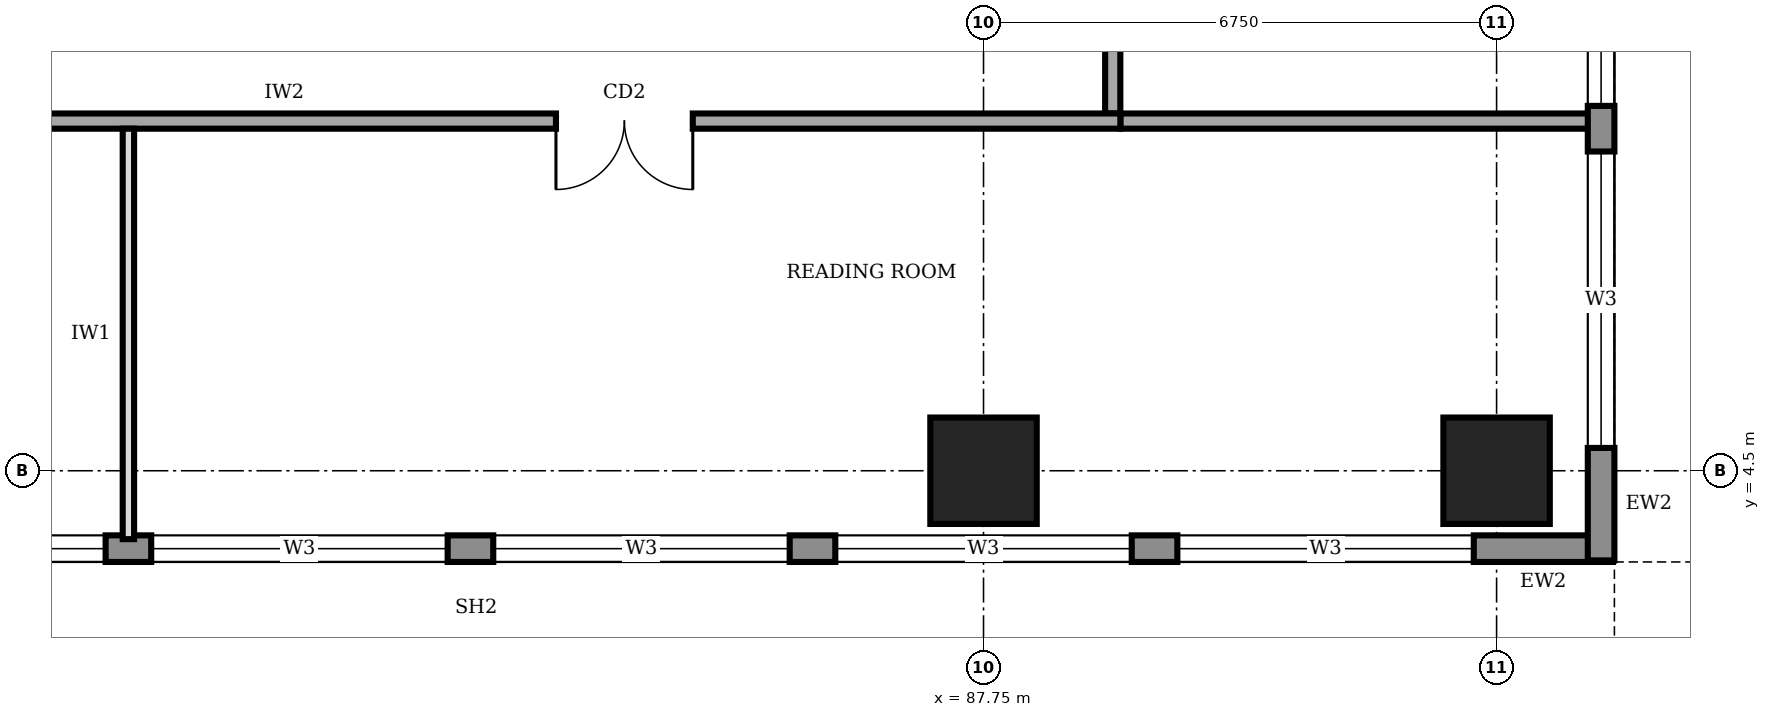
"""IFC4 building model, lengths in metres.
Left out: names, types, materials, properties, quantities, classifications, styles, units other than length and angle.
Written with IfcOpenShell. Run it as: python <this file> out.ifc"""

import sys

from ifc_helpers import new_model, si_unit, direction, frame, frame_2d, origin, origin_2d, place, context, subcontext, project, spatial, rectangle, extrude, element, fill, save


model = new_model("IFC4")
c1 = context("Model", 3, precision=1e-05, world=origin(), true_north=direction((0.0, 1.0)))
c2 = subcontext(c1, "Body", "Model", "MODEL_VIEW")
j1 = project(units=[si_unit("LENGTHUNIT", "METRE"), si_unit("PLANEANGLEUNIT", "RADIAN")], contexts=[c1])
p1 = place(None, origin())
s1 = spatial("IfcSite", under=j1, at=p1, CompositionType="ELEMENT")
p2 = place(p1, origin())
s2 = spatial("IfcBuilding", under=s1, at=p2, CompositionType="ELEMENT")
p3 = place(p2, frame((0.0, 0.0, 177.0)))
s3 = spatial("IfcBuildingStorey", under=s2, at=p3, CompositionType="ELEMENT", Elevation=177.0)
for number, where, z_axis, x_axis in (
    (1, (87.75, 4.5, 0.0), (0.0, 0.0, 1.0), (1.0, 0.0, 0.0)),
    (2, (94.5, 4.5, 0.0), (0.0, 0.0, 1.0), (1.0, 0.0, 0.0)),
):
    element("IfcColumn", number, at=place(p3, frame(where, z_axis=z_axis, x_axis=x_axis)), inside=s3, PredefinedType="COLUMN", context=c2, shape_type="SweptSolid", body=[
        extrude(rectangle(XDim=1.4, YDim=1.4, at=origin_2d()), origin(), (0.0, 0.0, 1.0), 4.0),
    ])
p4 = place(p3, frame((66.12, 3.475, 0.0), z_axis=(0.0, 0.0, 1.0), x_axis=(1.0, 0.0, 0.0)))
e3 = element("IfcWall", 3, at=p4, inside=s3, PredefinedType="STANDARD", context=c2, shape_type="SweptSolid", body=[
    extrude(rectangle(XDim=29.91, YDim=0.35, at=frame_2d((14.955, 0.0))), origin(), (0.0, 0.0, 1.0), 3.75),
])
p5 = place(p4, frame((1.68, 0.0, 0.95)))
e4 = element("IfcOpeningElement", 4, at=p5, cuts=e3, PredefinedType="OPENING", context=c2, shape_type="SweptSolid", body=[
    extrude(rectangle(XDim=3.9, YDim=1.8, at=frame_2d((1.95, 0.9))), frame((0.0, 0.185, 0.0), z_axis=(0.0, -1.0, 0.0), x_axis=(1.0, 0.0, 0.0)), (0.0, 0.0, 1.0), 0.37),
])
p6 = place(p4, frame((6.18, 0.0, 0.95)))
e5 = element("IfcOpeningElement", 5, at=p6, cuts=e3, PredefinedType="OPENING", context=c2, shape_type="SweptSolid", body=[
    extrude(rectangle(XDim=3.9, YDim=1.8, at=frame_2d((1.95, 0.9))), frame((0.0, 0.185, 0.0), z_axis=(0.0, -1.0, 0.0), x_axis=(1.0, 0.0, 0.0)), (0.0, 0.0, 1.0), 0.37),
])
p7 = place(p4, frame((10.68, 0.0, 0.95)))
e6 = element("IfcOpeningElement", 6, at=p7, cuts=e3, PredefinedType="OPENING", context=c2, shape_type="SweptSolid", body=[
    extrude(rectangle(XDim=3.9, YDim=1.8, at=frame_2d((1.95, 0.9))), frame((0.0, 0.185, 0.0), z_axis=(0.0, -1.0, 0.0), x_axis=(1.0, 0.0, 0.0)), (0.0, 0.0, 1.0), 0.37),
])
p8 = place(p4, frame((15.18, 0.0, 0.95)))
e7 = element("IfcOpeningElement", 7, at=p8, cuts=e3, PredefinedType="OPENING", context=c2, shape_type="SweptSolid", body=[
    extrude(rectangle(XDim=3.9, YDim=1.8, at=frame_2d((1.95, 0.9))), frame((0.0, 0.185, 0.0), z_axis=(0.0, -1.0, 0.0), x_axis=(1.0, 0.0, 0.0)), (0.0, 0.0, 1.0), 0.37),
])
p9 = place(p4, frame((19.68, 0.0, 0.95)))
e8 = element("IfcOpeningElement", 8, at=p9, cuts=e3, PredefinedType="OPENING", context=c2, shape_type="SweptSolid", body=[
    extrude(rectangle(XDim=3.9, YDim=1.8, at=frame_2d((1.95, 0.9))), frame((0.0, 0.185, 0.0), z_axis=(0.0, -1.0, 0.0), x_axis=(1.0, 0.0, 0.0)), (0.0, 0.0, 1.0), 0.37),
])
p10 = place(p4, frame((24.18, 0.0, 0.95)))
e9 = element("IfcOpeningElement", 9, at=p10, cuts=e3, PredefinedType="OPENING", context=c2, shape_type="SweptSolid", body=[
    extrude(rectangle(XDim=3.9, YDim=1.8, at=frame_2d((1.95, 0.9))), frame((0.0, 0.185, 0.0), z_axis=(0.0, -1.0, 0.0), x_axis=(1.0, 0.0, 0.0)), (0.0, 0.0, 1.0), 0.37),
])
p11 = place(p3, frame((95.875, 3.32, 0.0), z_axis=(0.0, 0.0, 1.0), x_axis=(0.0, 1.0, 0.0)))
e10 = element("IfcWall", 10, at=p11, inside=s3, PredefinedType="STANDARD", context=c2, shape_type="SweptSolid", body=[
    extrude(rectangle(XDim=33.86, YDim=0.35, at=frame_2d((16.93, 0.0))), origin(), (0.0, 0.0, 1.0), 3.75),
])
p12 = place(p11, frame((1.48, 0.0, 0.95)))
e11 = element("IfcOpeningElement", 11, at=p12, cuts=e10, PredefinedType="OPENING", context=c2, shape_type="SweptSolid", body=[
    extrude(rectangle(XDim=3.9, YDim=1.8, at=frame_2d((1.95, 0.9))), frame((0.0, 0.185, 0.0), z_axis=(0.0, -1.0, 0.0), x_axis=(1.0, 0.0, 0.0)), (0.0, 0.0, 1.0), 0.37),
])
p13 = place(p11, frame((5.98, 0.0, 0.95)))
e12 = element("IfcOpeningElement", 12, at=p13, cuts=e10, PredefinedType="OPENING", context=c2, shape_type="SweptSolid", body=[
    extrude(rectangle(XDim=3.9, YDim=1.8, at=frame_2d((1.95, 0.9))), frame((0.0, 0.185, 0.0), z_axis=(0.0, -1.0, 0.0), x_axis=(1.0, 0.0, 0.0)), (0.0, 0.0, 1.0), 0.37),
])
p14 = place(p11, frame((10.48, 0.0, 0.95)))
e13 = element("IfcOpeningElement", 13, at=p14, cuts=e10, PredefinedType="OPENING", context=c2, shape_type="SweptSolid", body=[
    extrude(rectangle(XDim=3.9, YDim=1.8, at=frame_2d((1.95, 0.9))), frame((0.0, 0.185, 0.0), z_axis=(0.0, -1.0, 0.0), x_axis=(1.0, 0.0, 0.0)), (0.0, 0.0, 1.0), 0.37),
])
p15 = place(p11, frame((14.98, 0.0, 0.95)))
e14 = element("IfcOpeningElement", 14, at=p15, cuts=e10, PredefinedType="OPENING", context=c2, shape_type="SweptSolid", body=[
    extrude(rectangle(XDim=3.9, YDim=1.8, at=frame_2d((1.95, 0.9))), frame((0.0, 0.185, 0.0), z_axis=(0.0, -1.0, 0.0), x_axis=(1.0, 0.0, 0.0)), (0.0, 0.0, 1.0), 0.37),
])
p16 = place(p11, frame((19.48, 0.0, 0.95)))
e15 = element("IfcOpeningElement", 15, at=p16, cuts=e10, PredefinedType="OPENING", context=c2, shape_type="SweptSolid", body=[
    extrude(rectangle(XDim=3.9, YDim=1.8, at=frame_2d((1.95, 0.9))), frame((0.0, 0.185, 0.0), z_axis=(0.0, -1.0, 0.0), x_axis=(1.0, 0.0, 0.0)), (0.0, 0.0, 1.0), 0.37),
])
p17 = place(p11, frame((23.98, 0.0, 0.95)))
e16 = element("IfcOpeningElement", 16, at=p17, cuts=e10, PredefinedType="OPENING", context=c2, shape_type="SweptSolid", body=[
    extrude(rectangle(XDim=3.9, YDim=1.8, at=frame_2d((1.95, 0.9))), frame((0.0, 0.185, 0.0), z_axis=(0.0, -1.0, 0.0), x_axis=(1.0, 0.0, 0.0)), (0.0, 0.0, 1.0), 0.37),
])
p18 = place(p11, frame((28.48, 0.0, 0.95)))
e17 = element("IfcOpeningElement", 17, at=p18, cuts=e10, PredefinedType="OPENING", context=c2, shape_type="SweptSolid", body=[
    extrude(rectangle(XDim=3.9, YDim=1.8, at=frame_2d((1.95, 0.9))), frame((0.0, 0.185, 0.0), z_axis=(0.0, -1.0, 0.0), x_axis=(1.0, 0.0, 0.0)), (0.0, 0.0, 1.0), 0.37),
])
p19 = place(p3, frame((72.65, 9.1, 0.0), z_axis=(0.0, 0.0, 1.0), x_axis=(1.0, 0.0, 0.0)))
e18 = element("IfcWall", 18, at=p19, inside=s3, PredefinedType="SOLIDWALL", context=c2, shape_type="SweptSolid", body=[
    extrude(rectangle(XDim=16.9, YDim=0.2, at=frame_2d((8.45, 0.0))), origin(), (0.0, 0.0, 1.0), 3.75),
])
p20 = place(p19, frame((1.325, 0.0, 0.0)))
e19 = element("IfcOpeningElement", 19, at=p20, cuts=e18, PredefinedType="OPENING", context=c2, shape_type="SweptSolid", body=[
    extrude(rectangle(XDim=1.0, YDim=2.1, at=frame_2d((0.5, 1.05))), frame((0.0, 0.11, 0.0), z_axis=(0.0, -1.0, 0.0), x_axis=(1.0, 0.0, 0.0)), (0.0, 0.0, 1.0), 0.22),
])
p21 = place(p19, frame((9.475, 0.0, 0.0)))
e20 = element("IfcOpeningElement", 20, at=p21, cuts=e18, PredefinedType="OPENING", context=c2, shape_type="SweptSolid", body=[
    extrude(rectangle(XDim=1.8, YDim=2.1, at=frame_2d((0.9, 1.05))), frame((0.0, 0.11, 0.0), z_axis=(0.0, -1.0, 0.0), x_axis=(1.0, 0.0, 0.0)), (0.0, 0.0, 1.0), 0.22),
])
p22 = place(p3, frame((89.45, 9.2, 0.0), z_axis=(0.0, 0.0, 1.0), x_axis=(0.0, 1.0, 0.0)))
e21 = element("IfcWall", 21, at=p22, inside=s3, PredefinedType="SOLIDWALL", context=c2, shape_type="SweptSolid", body=[
    extrude(rectangle(XDim=23.05, YDim=0.2, at=frame_2d((11.525, 0.0))), origin(), (0.0, 0.0, 1.0), 3.75),
])
p23 = place(p22, frame((1.55, 0.0, 0.0)))
e22 = element("IfcOpeningElement", 22, at=p23, cuts=e21, PredefinedType="OPENING", context=c2, shape_type="SweptSolid", body=[
    extrude(rectangle(XDim=1.0, YDim=2.1, at=frame_2d((0.5, 1.05))), frame((0.0, 0.11, 0.0), z_axis=(0.0, -1.0, 0.0), x_axis=(1.0, 0.0, 0.0)), (0.0, 0.0, 1.0), 0.22),
])
p24 = place(p22, frame((5.55, 0.0, 0.0)))
e23 = element("IfcOpeningElement", 23, at=p24, cuts=e21, PredefinedType="OPENING", context=c2, shape_type="SweptSolid", body=[
    extrude(rectangle(XDim=0.9, YDim=2.1, at=frame_2d((0.45, 1.05))), frame((0.0, 0.11, 0.0), z_axis=(0.0, -1.0, 0.0), x_axis=(1.0, 0.0, 0.0)), (0.0, 0.0, 1.0), 0.22),
])
p25 = place(p22, frame((10.35, 0.0, 0.0)))
e24 = element("IfcOpeningElement", 24, at=p25, cuts=e21, PredefinedType="OPENING", context=c2, shape_type="SweptSolid", body=[
    extrude(rectangle(XDim=0.9, YDim=2.1, at=frame_2d((0.45, 1.05))), frame((0.0, 0.11, 0.0), z_axis=(0.0, -1.0, 0.0), x_axis=(1.0, 0.0, 0.0)), (0.0, 0.0, 1.0), 0.22),
])
p26 = place(p22, frame((13.4, 0.0, 0.0)))
e25 = element("IfcOpeningElement", 25, at=p26, cuts=e21, PredefinedType="OPENING", context=c2, shape_type="SweptSolid", body=[
    extrude(rectangle(XDim=0.9, YDim=2.1, at=frame_2d((0.45, 1.05))), frame((0.0, 0.11, 0.0), z_axis=(0.0, -1.0, 0.0), x_axis=(1.0, 0.0, 0.0)), (0.0, 0.0, 1.0), 0.22),
])
p27 = place(p22, frame((16.3, 0.0, 0.0)))
e26 = element("IfcOpeningElement", 26, at=p27, cuts=e21, PredefinedType="OPENING", context=c2, shape_type="SweptSolid", body=[
    extrude(rectangle(XDim=1.0, YDim=2.1, at=frame_2d((0.5, 1.05))), frame((0.0, 0.11, 0.0), z_axis=(0.0, -1.0, 0.0), x_axis=(1.0, 0.0, 0.0)), (0.0, 0.0, 1.0), 0.22),
])
p28 = place(p22, frame((8.2, 0.0, 0.0)))
e27 = element("IfcOpeningElement", 27, at=p28, cuts=e21, PredefinedType="OPENING", context=c2, shape_type="SweptSolid", body=[
    extrude(rectangle(XDim=1.0, YDim=2.1, at=frame_2d((0.5, 1.05))), frame((0.0, 0.11, 0.0), z_axis=(0.0, -1.0, 0.0), x_axis=(1.0, 0.0, 0.0)), (0.0, 0.0, 1.0), 0.22),
])
p29 = place(p22, frame((19.925, 0.0, 0.0)))
e28 = element("IfcOpeningElement", 28, at=p29, cuts=e21, PredefinedType="OPENING", context=c2, shape_type="SweptSolid", body=[
    extrude(rectangle(XDim=1.0, YDim=2.1, at=frame_2d((0.5, 1.05))), frame((0.0, 0.11, 0.0), z_axis=(0.0, -1.0, 0.0), x_axis=(1.0, 0.0, 0.0)), (0.0, 0.0, 1.0), 0.22),
])
p30 = place(p3, frame((89.55, 9.1, 0.0), z_axis=(0.0, 0.0, 1.0), x_axis=(1.0, 0.0, 0.0)))
e29 = element("IfcWall", 29, at=p30, inside=s3, PredefinedType="SOLIDWALL", context=c2, shape_type="SweptSolid", body=[
    extrude(rectangle(XDim=6.2, YDim=0.2, at=frame_2d((3.1, 0.0))), origin(), (0.0, 0.0, 1.0), 3.75),
])
p31 = place(p3, frame((76.5, 3.6, 0.0), z_axis=(0.0, 0.0, 1.0), x_axis=(0.0, 1.0, 0.0)))
e30 = element("IfcWall", 30, at=p31, inside=s3, PredefinedType="PARTITIONING", context=c2, shape_type="SweptSolid", body=[
    extrude(rectangle(XDim=5.4, YDim=0.15, at=frame_2d((2.7, 0.0))), origin(), (0.0, 0.0, 1.0), 3.75),
])
p32 = place(p6, origin())
e31 = element("IfcWindow", 31, at=p32, inside=s3, PartitioningType="SINGLE_PANEL", PredefinedType="WINDOW", context=c2, shape_type="SweptSolid", body=[
    extrude(rectangle(XDim=3.9, YDim=1.8, at=frame_2d((1.95, 0.9))), frame((0.0, 0.03, 0.0), z_axis=(0.0, -1.0, 0.0), x_axis=(1.0, 0.0, 0.0)), (0.0, 0.0, 1.0), 0.06),
])
fill(e5, e31)
p33 = place(p7, origin())
e32 = element("IfcWindow", 32, at=p33, inside=s3, PartitioningType="SINGLE_PANEL", PredefinedType="WINDOW", context=c2, shape_type="SweptSolid", body=[
    extrude(rectangle(XDim=3.9, YDim=1.8, at=frame_2d((1.95, 0.9))), frame((0.0, 0.03, 0.0), z_axis=(0.0, -1.0, 0.0), x_axis=(1.0, 0.0, 0.0)), (0.0, 0.0, 1.0), 0.06),
])
fill(e6, e32)
p34 = place(p8, origin())
e33 = element("IfcWindow", 33, at=p34, inside=s3, PartitioningType="SINGLE_PANEL", PredefinedType="WINDOW", context=c2, shape_type="SweptSolid", body=[
    extrude(rectangle(XDim=3.9, YDim=1.8, at=frame_2d((1.95, 0.9))), frame((0.0, 0.03, 0.0), z_axis=(0.0, -1.0, 0.0), x_axis=(1.0, 0.0, 0.0)), (0.0, 0.0, 1.0), 0.06),
])
fill(e7, e33)
p35 = place(p9, origin())
e34 = element("IfcWindow", 34, at=p35, inside=s3, PartitioningType="SINGLE_PANEL", PredefinedType="WINDOW", context=c2, shape_type="SweptSolid", body=[
    extrude(rectangle(XDim=3.9, YDim=1.8, at=frame_2d((1.95, 0.9))), frame((0.0, 0.03, 0.0), z_axis=(0.0, -1.0, 0.0), x_axis=(1.0, 0.0, 0.0)), (0.0, 0.0, 1.0), 0.06),
])
fill(e8, e34)
p36 = place(p10, origin())
e35 = element("IfcWindow", 35, at=p36, inside=s3, PartitioningType="SINGLE_PANEL", PredefinedType="WINDOW", context=c2, shape_type="SweptSolid", body=[
    extrude(rectangle(XDim=3.9, YDim=1.8, at=frame_2d((1.95, 0.9))), frame((0.0, 0.03, 0.0), z_axis=(0.0, -1.0, 0.0), x_axis=(1.0, 0.0, 0.0)), (0.0, 0.0, 1.0), 0.06),
])
fill(e9, e35)
p37 = place(p12, origin())
e36 = element("IfcWindow", 36, at=p37, inside=s3, PartitioningType="SINGLE_PANEL", PredefinedType="WINDOW", context=c2, shape_type="SweptSolid", body=[
    extrude(rectangle(XDim=3.9, YDim=1.8, at=frame_2d((1.95, 0.9))), frame((0.0, 0.03, 0.0), z_axis=(0.0, -1.0, 0.0), x_axis=(1.0, 0.0, 0.0)), (0.0, 0.0, 1.0), 0.06),
])
fill(e11, e36)
p38 = place(p13, origin())
e37 = element("IfcWindow", 37, at=p38, inside=s3, PartitioningType="SINGLE_PANEL", PredefinedType="WINDOW", context=c2, shape_type="SweptSolid", body=[
    extrude(rectangle(XDim=3.9, YDim=1.8, at=frame_2d((1.95, 0.9))), frame((0.0, 0.03, 0.0), z_axis=(0.0, -1.0, 0.0), x_axis=(1.0, 0.0, 0.0)), (0.0, 0.0, 1.0), 0.06),
])
fill(e12, e37)
p39 = place(p21, frame((1.8, 0.0, 0.0), z_axis=(0.0, 0.0, 1.0), x_axis=(-1.0, 0.0, 0.0)))
e38 = element("IfcDoor", 38, at=p39, inside=s3, OperationType="DOUBLE_DOOR_SINGLE_SWING", PredefinedType="DOOR", context=c2, shape_type="SweptSolid", body=[
    extrude(rectangle(XDim=1.8, YDim=2.1, at=frame_2d((0.9, 1.05))), frame((0.0, 0.025, 0.0), z_axis=(0.0, -1.0, 0.0), x_axis=(1.0, 0.0, 0.0)), (0.0, 0.0, 1.0), 0.05),
])
fill(e20, e38)
save(model, sys.argv[1])
